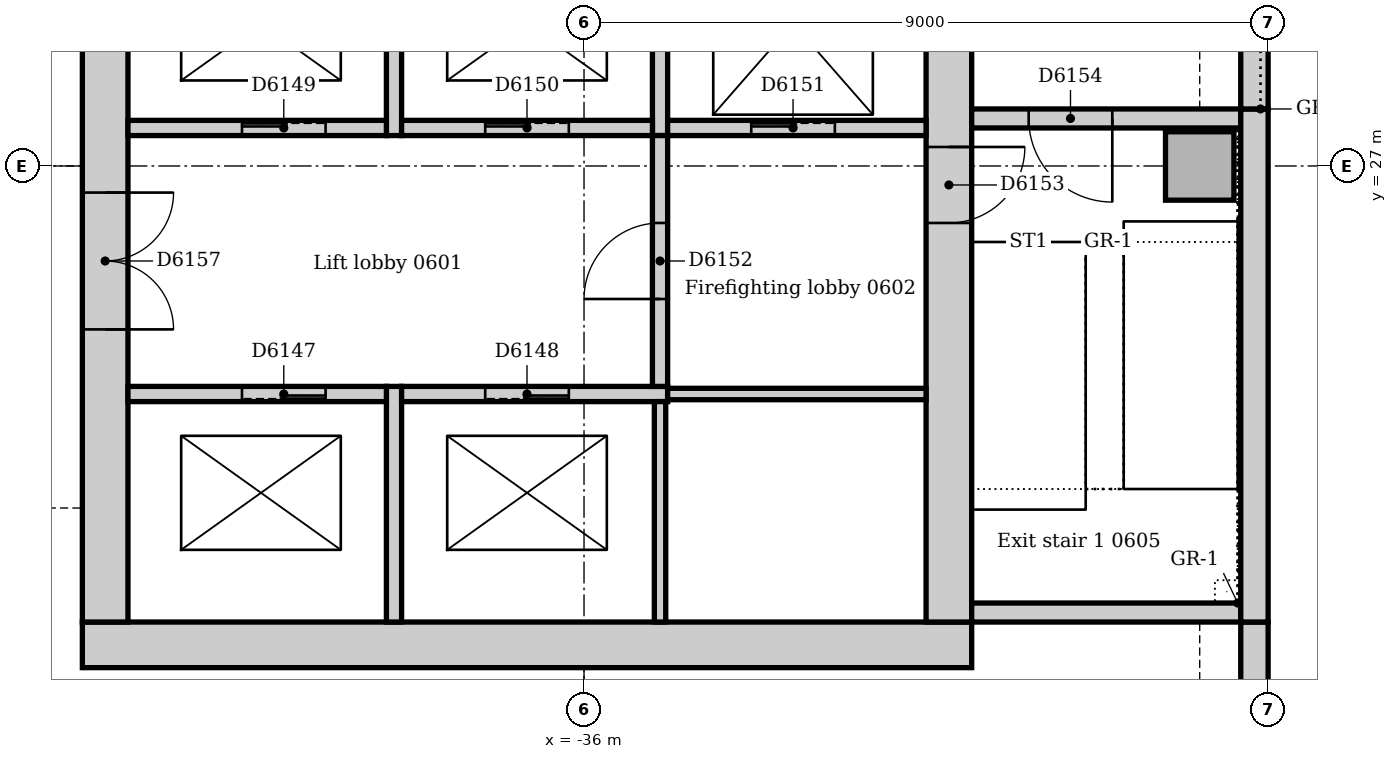
"""IFC4 building model, lengths in metres.
Left out: names, types, materials, properties, quantities, classifications, styles, units other than length and angle.
Written with IfcOpenShell. Run it as: python <this file> out.ifc"""

import sys

from ifc_helpers import new_model, si_unit, direction, frame, frame_2d, origin, origin_2d, place, context, subcontext, project, spatial, rectangle, extrude, element, fill, save


model = new_model("IFC4")
c1 = context("Model", 3, precision=1e-05, world=origin(), true_north=direction((0.0, 1.0)))
c2 = subcontext(c1, "Body", "Model", "MODEL_VIEW")
j1 = project(units=[si_unit("LENGTHUNIT", "METRE"), si_unit("PLANEANGLEUNIT", "RADIAN")], contexts=[c1])
p1 = place(None, origin())
s1 = spatial("IfcSite", under=j1, at=p1, CompositionType="ELEMENT")
p2 = place(p1, origin())
s2 = spatial("IfcBuilding", under=s1, at=p2, CompositionType="ELEMENT")
p3 = place(p2, frame((0.0, 0.0, 30.0)))
s3 = spatial("IfcBuildingStorey", under=s2, at=p3, CompositionType="ELEMENT", Elevation=30.0)
p4 = place(p3, frame((-42.6, 20.7, 0.0), z_axis=(0.0, 0.0, 1.0), x_axis=(1.0, 0.0, 0.0)))
e1 = element("IfcWall", 1, at=p4, inside=s3, PredefinedType="SOLIDWALL", context=c2, shape_type="SweptSolid", body=[
    extrude(rectangle(XDim=11.7, YDim=0.6, at=frame_2d((5.85, 0.0))), origin(), (0.0, 0.0, 1.0), 4.0),
])
p5 = place(p3, frame((-31.2, 21.0, 0.0), z_axis=(0.0, 0.0, 1.0), x_axis=(0.0, 1.0, 0.0)))
e2 = element("IfcWall", 2, at=p5, inside=s3, PredefinedType="SOLIDWALL", context=c2, shape_type="SweptSolid", body=[
    extrude(rectangle(XDim=9.5, YDim=0.6, at=frame_2d((4.75, 0.0))), origin(), (0.0, 0.0, 1.0), 4.0),
])
p6 = place(p5, frame((5.25, 0.0, 0.0)))
e3 = element("IfcOpeningElement", 3, at=p6, cuts=e2, PredefinedType="OPENING", context=c2, shape_type="SweptSolid", body=[
    extrude(rectangle(XDim=1.0, YDim=2.1, at=frame_2d((0.5, 1.05))), frame((0.0, 0.31, 0.0), z_axis=(0.0, -1.0, 0.0), x_axis=(1.0, 0.0, 0.0)), (0.0, 0.0, 1.0), 0.62),
])
p7 = place(p3, frame((-42.3, 30.5, 0.0), z_axis=(0.0, 0.0, 1.0), x_axis=(0.0, -1.0, 0.0)))
e4 = element("IfcWall", 4, at=p7, inside=s3, PredefinedType="SOLIDWALL", context=c2, shape_type="SweptSolid", body=[
    extrude(rectangle(XDim=9.5, YDim=0.6, at=frame_2d((4.75, 0.0))), origin(), (0.0, 0.0, 1.0), 4.0),
])
p8 = place(p7, frame((3.85, 0.0, 0.0)))
e5 = element("IfcOpeningElement", 5, at=p8, cuts=e4, PredefinedType="OPENING", context=c2, shape_type="SweptSolid", body=[
    extrude(rectangle(XDim=1.8, YDim=2.1, at=frame_2d((0.9, 1.05))), frame((0.0, 0.31, 0.0), z_axis=(0.0, -1.0, 0.0), x_axis=(1.0, 0.0, 0.0)), (0.0, 0.0, 1.0), 0.62),
])
p9 = place(p3, frame((-30.9, 21.125, 0.0), z_axis=(0.0, 0.0, 1.0), x_axis=(1.0, 0.0, 0.0)))
e6 = element("IfcWall", 6, at=p9, inside=s3, PredefinedType="SOLIDWALL", context=c2, shape_type="SweptSolid", body=[
    extrude(rectangle(XDim=3.54, YDim=0.25, at=frame_2d((1.77, 0.0))), origin(), (0.0, 0.0, 1.0), 4.0),
])
p10 = place(p3, frame((-27.36, 27.625, 0.0), z_axis=(0.0, 0.0, 1.0), x_axis=(-1.0, 0.0, 0.0)))
e7 = element("IfcWall", 7, at=p10, inside=s3, PredefinedType="SOLIDWALL", context=c2, shape_type="SweptSolid", body=[
    extrude(rectangle(XDim=3.54, YDim=0.25, at=frame_2d((1.77, 0.0))), origin(), (0.0, 0.0, 1.0), 4.0),
])
p11 = place(p10, frame((1.69, 0.0, 0.0)))
e8 = element("IfcOpeningElement", 8, at=p11, cuts=e7, PredefinedType="OPENING", context=c2, shape_type="SweptSolid", body=[
    extrude(rectangle(XDim=1.1, YDim=2.1, at=frame_2d((0.55, 1.05))), frame((0.0, 0.135, 0.0), z_axis=(0.0, -1.0, 0.0), x_axis=(1.0, 0.0, 0.0)), (0.0, 0.0, 1.0), 0.27),
])
p12 = place(p3, frame((-27.9, 27.0, 0.0), z_axis=(0.0, 0.0, 1.0), x_axis=(1.0, 0.0, 0.0)))
e9 = element("IfcColumn", 9, at=p12, inside=s3, PredefinedType="COLUMN", context=c2, shape_type="SweptSolid", body=[
    extrude(rectangle(XDim=0.9, YDim=0.9, at=origin_2d()), origin(), (0.0, 0.0, 1.0), 4.0),
])
p13 = place(p3, frame((-27.18, 8.743, 0.0), z_axis=(0.0, 0.0, 1.0), x_axis=(0.0, 1.0, 0.0)))
e10 = element("IfcWall", 10, at=p13, inside=s3, PredefinedType="STANDARD", context=c2, shape_type="SweptSolid", body=[
    extrude(rectangle(XDim=12.257, YDim=0.36, at=frame_2d((6.129, 0.0))), origin(), (0.0, 0.0, 1.0), 3.85),
])
p14 = place(p13, frame((2.607, 0.0, 0.9)))
e11 = element("IfcOpeningElement", 11, at=p14, cuts=e10, PredefinedType="OPENING", context=c2, shape_type="SweptSolid", body=[
    extrude(rectangle(XDim=3.3, YDim=1.6, at=frame_2d((1.65, 0.8))), frame((0.0, 0.19, 0.0), z_axis=(0.0, -1.0, 0.0), x_axis=(1.0, 0.0, 0.0)), (0.0, 0.0, 1.0), 0.38),
])
p15 = place(p13, frame((7.607, 0.0, 0.9)))
e12 = element("IfcOpeningElement", 12, at=p15, cuts=e10, PredefinedType="OPENING", context=c2, shape_type="SweptSolid", body=[
    extrude(rectangle(XDim=3.3, YDim=1.6, at=frame_2d((1.65, 0.8))), frame((0.0, 0.19, 0.0), z_axis=(0.0, -1.0, 0.0), x_axis=(1.0, 0.0, 0.0)), (0.0, 0.0, 1.0), 0.38),
])
p16 = place(p3, frame((-27.18, 21.0, 0.0), z_axis=(0.0, 0.0, 1.0), x_axis=(0.0, 1.0, 0.0)))
e13 = element("IfcWall", 13, at=p16, inside=s3, PredefinedType="STANDARD", context=c2, shape_type="SweptSolid", body=[
    extrude(rectangle(XDim=6.75, YDim=0.36, at=frame_2d((3.375, 0.0))), origin(), (0.0, 0.0, 1.0), 3.85),
])
p17 = place(p3, frame((-27.18, 27.75, 0.0), z_axis=(0.0, 0.0, 1.0), x_axis=(0.0, 1.0, 0.0)))
e14 = element("IfcWall", 14, at=p17, inside=s3, PredefinedType="STANDARD", context=c2, shape_type="SweptSolid", body=[
    extrude(rectangle(XDim=7.5, YDim=0.36, at=frame_2d((3.75, 0.0))), origin(), (0.0, 0.0, 1.0), 3.85),
])
p18 = place(p17, frame((2.85, 0.0, 1.2)))
e15 = element("IfcOpeningElement", 15, at=p18, cuts=e14, PredefinedType="OPENING", context=c2, shape_type="SweptSolid", body=[
    extrude(rectangle(XDim=1.8, YDim=1.2, at=frame_2d((0.9, 0.6))), frame((0.0, 0.19, 0.0), z_axis=(0.0, -1.0, 0.0), x_axis=(1.0, 0.0, 0.0)), (0.0, 0.0, 1.0), 0.38),
])
p19 = place(p3, frame((-38.5, 21.0, 0.0), z_axis=(0.0, 0.0, 1.0), x_axis=(0.0, 1.0, 0.0)))
e16 = element("IfcWall", 16, at=p19, inside=s3, PredefinedType="SOLIDWALL", context=c2, shape_type="SweptSolid", body=[
    extrude(rectangle(XDim=3.1, YDim=0.2, at=frame_2d((1.55, 0.0))), origin(), (0.0, 0.0, 1.0), 4.0),
])
p20 = place(p3, frame((-38.6, 24.0, 0.0), z_axis=(0.0, 0.0, 1.0), x_axis=(-1.0, 0.0, 0.0)))
e17 = element("IfcWall", 17, at=p20, inside=s3, PredefinedType="SOLIDWALL", context=c2, shape_type="SweptSolid", body=[
    extrude(rectangle(XDim=3.4, YDim=0.2, at=frame_2d((1.7, 0.0))), origin(), (0.0, 0.0, 1.0), 4.0),
])
p21 = place(p20, frame((0.8, 0.0, 0.0)))
e18 = element("IfcOpeningElement", 18, at=p21, cuts=e17, PredefinedType="OPENING", context=c2, shape_type="SweptSolid", body=[
    extrude(rectangle(XDim=1.1, YDim=2.1, at=frame_2d((0.55, 1.05))), frame((0.0, 0.11, 0.0), z_axis=(0.0, -1.0, 0.0), x_axis=(1.0, 0.0, 0.0)), (0.0, 0.0, 1.0), 0.22),
])
p22 = place(p3, frame((-34.9, 24.0, 0.0), z_axis=(0.0, 0.0, 1.0), x_axis=(-1.0, 0.0, 0.0)))
e19 = element("IfcWall", 19, at=p22, inside=s3, PredefinedType="SOLIDWALL", context=c2, shape_type="SweptSolid", body=[
    extrude(rectangle(XDim=3.5, YDim=0.2, at=frame_2d((1.75, 0.0))), origin(), (0.0, 0.0, 1.0), 4.0),
])
p23 = place(p22, frame((1.3, 0.0, 0.0)))
e20 = element("IfcOpeningElement", 20, at=p23, cuts=e19, PredefinedType="OPENING", context=c2, shape_type="SweptSolid", body=[
    extrude(rectangle(XDim=1.1, YDim=2.1, at=frame_2d((0.55, 1.05))), frame((0.0, 0.11, 0.0), z_axis=(0.0, -1.0, 0.0), x_axis=(1.0, 0.0, 0.0)), (0.0, 0.0, 1.0), 0.22),
])
p24 = place(p3, frame((-38.5, 27.4, 0.0), z_axis=(0.0, 0.0, 1.0), x_axis=(0.0, 1.0, 0.0)))
e21 = element("IfcWall", 21, at=p24, inside=s3, PredefinedType="SOLIDWALL", context=c2, shape_type="SweptSolid", body=[
    extrude(rectangle(XDim=2.85, YDim=0.2, at=frame_2d((1.425, 0.0))), origin(), (0.0, 0.0, 1.0), 4.0),
])
p25 = place(p3, frame((-42.0, 27.5, 0.0), z_axis=(0.0, 0.0, 1.0), x_axis=(1.0, 0.0, 0.0)))
e22 = element("IfcWall", 22, at=p25, inside=s3, PredefinedType="SOLIDWALL", context=c2, shape_type="SweptSolid", body=[
    extrude(rectangle(XDim=3.4, YDim=0.2, at=frame_2d((1.7, 0.0))), origin(), (0.0, 0.0, 1.0), 4.0),
])
p26 = place(p25, frame((1.5, 0.0, 0.0)))
e23 = element("IfcOpeningElement", 23, at=p26, cuts=e22, PredefinedType="OPENING", context=c2, shape_type="SweptSolid", body=[
    extrude(rectangle(XDim=1.1, YDim=2.1, at=frame_2d((0.55, 1.05))), frame((0.0, 0.11, 0.0), z_axis=(0.0, -1.0, 0.0), x_axis=(1.0, 0.0, 0.0)), (0.0, 0.0, 1.0), 0.22),
])
p27 = place(p3, frame((-35.0, 27.4, 0.0), z_axis=(0.0, 0.0, 1.0), x_axis=(0.0, 1.0, 0.0)))
e24 = element("IfcWall", 24, at=p27, inside=s3, PredefinedType="SOLIDWALL", context=c2, shape_type="SweptSolid", body=[
    extrude(rectangle(XDim=2.85, YDim=0.2, at=frame_2d((1.425, 0.0))), origin(), (0.0, 0.0, 1.0), 4.0),
])
p28 = place(p3, frame((-38.4, 27.5, 0.0), z_axis=(0.0, 0.0, 1.0), x_axis=(1.0, 0.0, 0.0)))
e25 = element("IfcWall", 25, at=p28, inside=s3, PredefinedType="SOLIDWALL", context=c2, shape_type="SweptSolid", body=[
    extrude(rectangle(XDim=3.3, YDim=0.2, at=frame_2d((1.65, 0.0))), origin(), (0.0, 0.0, 1.0), 4.0),
])
p29 = place(p28, frame((1.1, 0.0, 0.0)))
e26 = element("IfcOpeningElement", 26, at=p29, cuts=e25, PredefinedType="OPENING", context=c2, shape_type="SweptSolid", body=[
    extrude(rectangle(XDim=1.1, YDim=2.1, at=frame_2d((0.55, 1.05))), frame((0.0, 0.11, 0.0), z_axis=(0.0, -1.0, 0.0), x_axis=(1.0, 0.0, 0.0)), (0.0, 0.0, 1.0), 0.22),
])
p30 = place(p3, frame((-34.9, 27.5, 0.0), z_axis=(0.0, 0.0, 1.0), x_axis=(1.0, 0.0, 0.0)))
e27 = element("IfcWall", 27, at=p30, inside=s3, PredefinedType="SOLIDWALL", context=c2, shape_type="SweptSolid", body=[
    extrude(rectangle(XDim=3.4, YDim=0.2, at=frame_2d((1.7, 0.0))), origin(), (0.0, 0.0, 1.0), 4.0),
])
p31 = place(p30, frame((1.1, 0.0, 0.0)))
e28 = element("IfcOpeningElement", 28, at=p31, cuts=e27, PredefinedType="OPENING", context=c2, shape_type="SweptSolid", body=[
    extrude(rectangle(XDim=1.1, YDim=2.1, at=frame_2d((0.55, 1.05))), frame((0.0, 0.11, 0.0), z_axis=(0.0, -1.0, 0.0), x_axis=(1.0, 0.0, 0.0)), (0.0, 0.0, 1.0), 0.22),
])
p32 = place(p3, frame((-35.0, 24.1, 0.0), z_axis=(0.0, 0.0, 1.0), x_axis=(0.0, 1.0, 0.0)))
e29 = element("IfcWall", 29, at=p32, inside=s3, PredefinedType="SOLIDWALL", context=c2, shape_type="SweptSolid", body=[
    extrude(rectangle(XDim=3.3, YDim=0.2, at=frame_2d((1.65, 0.0))), origin(), (0.0, 0.0, 1.0), 4.0),
])
p33 = place(p32, frame((1.15, 0.0, 0.0)))
e30 = element("IfcOpeningElement", 30, at=p33, cuts=e29, PredefinedType="OPENING", context=c2, shape_type="SweptSolid", body=[
    extrude(rectangle(XDim=1.0, YDim=2.1, at=frame_2d((0.5, 1.05))), frame((0.0, 0.11, 0.0), z_axis=(0.0, -1.0, 0.0), x_axis=(1.0, 0.0, 0.0)), (0.0, 0.0, 1.0), 0.22),
])
p34 = place(p3, frame((-35.0, 21.0, 0.0), z_axis=(0.0, 0.0, 1.0), x_axis=(0.0, 1.0, 0.0)))
e31 = element("IfcWall", 31, at=p34, inside=s3, PredefinedType="SOLIDWALL", context=c2, shape_type="SweptSolid", body=[
    extrude(rectangle(XDim=2.9, YDim=0.15, at=frame_2d((1.45, 0.0))), origin(), (0.0, 0.0, 1.0), 4.0),
])
p35 = place(p3, frame((-31.5, 24.0, 0.0), z_axis=(0.0, 0.0, 1.0), x_axis=(-1.0, 0.0, 0.0)))
e32 = element("IfcWall", 32, at=p35, inside=s3, PredefinedType="SOLIDWALL", context=c2, shape_type="SweptSolid", body=[
    extrude(rectangle(XDim=3.4, YDim=0.15, at=frame_2d((1.7, 0.0))), origin(), (0.0, 0.0, 1.0), 4.0),
])
p36 = place(p21, origin())
e33 = element("IfcDoor", 33, at=p36, inside=s3, OperationType="SLIDING_TO_LEFT", PredefinedType="DOOR", context=c2, shape_type="SweptSolid", body=[
    extrude(rectangle(XDim=1.1, YDim=2.1, at=frame_2d((0.55, 1.05))), frame((0.0, 0.025, 0.0), z_axis=(0.0, -1.0, 0.0), x_axis=(1.0, 0.0, 0.0)), (0.0, 0.0, 1.0), 0.05),
])
fill(e18, e33)
p37 = place(p23, origin())
e34 = element("IfcDoor", 34, at=p37, inside=s3, OperationType="SLIDING_TO_LEFT", PredefinedType="DOOR", context=c2, shape_type="SweptSolid", body=[
    extrude(rectangle(XDim=1.1, YDim=2.1, at=frame_2d((0.55, 1.05))), frame((0.0, 0.025, 0.0), z_axis=(0.0, -1.0, 0.0), x_axis=(1.0, 0.0, 0.0)), (0.0, 0.0, 1.0), 0.05),
])
fill(e20, e34)
p38 = place(p26, origin())
e35 = element("IfcDoor", 35, at=p38, inside=s3, OperationType="SLIDING_TO_LEFT", PredefinedType="DOOR", context=c2, shape_type="SweptSolid", body=[
    extrude(rectangle(XDim=1.1, YDim=2.1, at=frame_2d((0.55, 1.05))), frame((0.0, 0.025, 0.0), z_axis=(0.0, -1.0, 0.0), x_axis=(1.0, 0.0, 0.0)), (0.0, 0.0, 1.0), 0.05),
])
fill(e23, e35)
p39 = place(p29, origin())
e36 = element("IfcDoor", 36, at=p39, inside=s3, OperationType="SLIDING_TO_LEFT", PredefinedType="DOOR", context=c2, shape_type="SweptSolid", body=[
    extrude(rectangle(XDim=1.1, YDim=2.1, at=frame_2d((0.55, 1.05))), frame((0.0, 0.025, 0.0), z_axis=(0.0, -1.0, 0.0), x_axis=(1.0, 0.0, 0.0)), (0.0, 0.0, 1.0), 0.05),
])
fill(e26, e36)
p40 = place(p31, origin())
e37 = element("IfcDoor", 37, at=p40, inside=s3, OperationType="SLIDING_TO_LEFT", PredefinedType="DOOR", context=c2, shape_type="SweptSolid", body=[
    extrude(rectangle(XDim=1.1, YDim=2.1, at=frame_2d((0.55, 1.05))), frame((0.0, 0.025, 0.0), z_axis=(0.0, -1.0, 0.0), x_axis=(1.0, 0.0, 0.0)), (0.0, 0.0, 1.0), 0.05),
])
fill(e28, e37)
p41 = place(p33, origin())
e38 = element("IfcDoor", 38, at=p41, inside=s3, OperationType="SINGLE_SWING_LEFT", PredefinedType="DOOR", context=c2, shape_type="SweptSolid", body=[
    extrude(rectangle(XDim=1.0, YDim=2.1, at=frame_2d((0.5, 1.05))), frame((0.0, 0.025, 0.0), z_axis=(0.0, -1.0, 0.0), x_axis=(1.0, 0.0, 0.0)), (0.0, 0.0, 1.0), 0.05),
])
fill(e30, e38)
p42 = place(p6, frame((1.0, 0.0, 0.0), z_axis=(0.0, 0.0, 1.0), x_axis=(-1.0, 0.0, 0.0)))
e39 = element("IfcDoor", 39, at=p42, inside=s3, OperationType="SINGLE_SWING_LEFT", PredefinedType="DOOR", context=c2, shape_type="SweptSolid", body=[
    extrude(rectangle(XDim=1.0, YDim=2.1, at=frame_2d((0.5, 1.05))), frame((0.0, 0.025, 0.0), z_axis=(0.0, -1.0, 0.0), x_axis=(1.0, 0.0, 0.0)), (0.0, 0.0, 1.0), 0.05),
])
fill(e3, e39)
p43 = place(p11, origin())
e40 = element("IfcDoor", 40, at=p43, inside=s3, OperationType="SINGLE_SWING_LEFT", PredefinedType="DOOR", context=c2, shape_type="SweptSolid", body=[
    extrude(rectangle(XDim=1.1, YDim=2.1, at=frame_2d((0.55, 1.05))), frame((0.0, 0.025, 0.0), z_axis=(0.0, -1.0, 0.0), x_axis=(1.0, 0.0, 0.0)), (0.0, 0.0, 1.0), 0.05),
])
fill(e8, e40)
p44 = place(p8, origin())
e41 = element("IfcDoor", 41, at=p44, inside=s3, OperationType="DOUBLE_DOOR_SINGLE_SWING", PredefinedType="DOOR", context=c2, shape_type="SweptSolid", body=[
    extrude(rectangle(XDim=1.8, YDim=2.1, at=frame_2d((0.9, 1.05))), frame((0.0, 0.025, 0.0), z_axis=(0.0, -1.0, 0.0), x_axis=(1.0, 0.0, 0.0)), (0.0, 0.0, 1.0), 0.05),
])
fill(e5, e41)
save(model, sys.argv[1])
